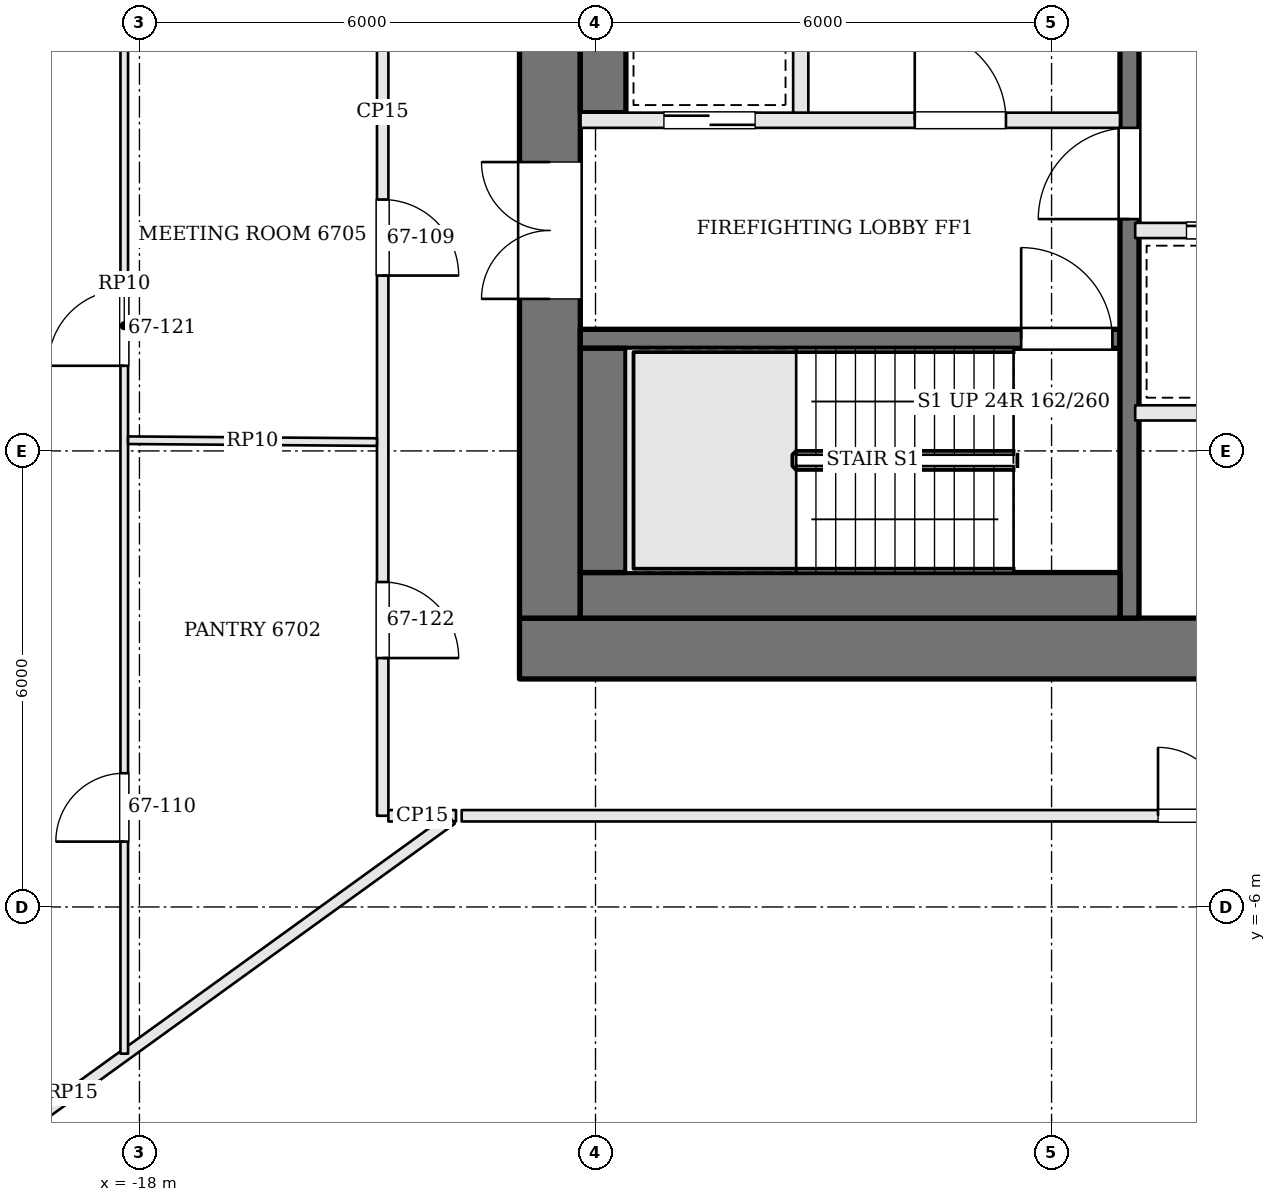
"""IFC4 building model, lengths in metres.
Left out: names, types, materials, properties, quantities, classifications, styles, units other than length and angle.
Written with IfcOpenShell. Run it as: python <this file> out.ifc"""

import sys

from ifc_helpers import new_model, si_unit, direction, frame, frame_2d, origin, place, context, subcontext, project, spatial, rectangle, extrude, element, fill, save


model = new_model("IFC4")
c1 = context("Model", 3, precision=1e-05, world=origin(), true_north=direction((0.0, 1.0)))
c2 = subcontext(c1, "Body", "Model", "MODEL_VIEW")
j1 = project(units=[si_unit("LENGTHUNIT", "METRE"), si_unit("PLANEANGLEUNIT", "RADIAN")], contexts=[c1])
p1 = place(None, origin())
s1 = spatial("IfcSite", under=j1, at=p1, CompositionType="ELEMENT")
p2 = place(p1, origin())
s2 = spatial("IfcBuilding", under=s1, at=p2, CompositionType="ELEMENT")
p3 = place(p2, frame((0.0, 0.0, 272.7)))
s3 = spatial("IfcBuildingStorey", under=s2, at=p3, CompositionType="ELEMENT", Elevation=272.7)
p4 = place(p3, frame((-13.0, -2.6, 0.0), z_axis=(0.0, 0.0, 1.0), x_axis=(1.0, 0.0, 0.0)))
e1 = element("IfcWall", 1, at=p4, inside=s3, PredefinedType="SHEAR", context=c2, shape_type="SweptSolid", body=[
    extrude(rectangle(XDim=26.0, YDim=0.8, at=frame_2d((13.0, 0.0))), origin(), (0.0, 0.0, 1.0), 3.9),
])
p5 = place(p4, frame((9.475, 0.0, 0.0)))
e2 = element("IfcOpeningElement", 2, at=p5, cuts=e1, PredefinedType="OPENING", context=c2, shape_type="SweptSolid", body=[
    extrude(rectangle(XDim=0.9, YDim=2.1, at=frame_2d((0.45, 1.05))), frame((0.0, 0.41, 0.0), z_axis=(0.0, -1.0, 0.0), x_axis=(1.0, 0.0, 0.0)), (0.0, 0.0, 1.0), 0.82),
])
p6 = place(p4, frame((12.75, 0.0, 0.0)))
e3 = element("IfcOpeningElement", 3, at=p6, cuts=e1, PredefinedType="OPENING", context=c2, shape_type="SweptSolid", body=[
    extrude(rectangle(XDim=0.9, YDim=2.1, at=frame_2d((0.45, 1.05))), frame((0.0, 0.41, 0.0), z_axis=(0.0, -1.0, 0.0), x_axis=(1.0, 0.0, 0.0)), (0.0, 0.0, 1.0), 0.82),
])
p7 = place(p4, frame((15.05, 0.0, 0.0)))
e4 = element("IfcOpeningElement", 4, at=p7, cuts=e1, PredefinedType="OPENING", context=c2, shape_type="SweptSolid", body=[
    extrude(rectangle(XDim=1.0, YDim=2.1, at=frame_2d((0.5, 1.05))), frame((0.0, 0.41, 0.0), z_axis=(0.0, -1.0, 0.0), x_axis=(1.0, 0.0, 0.0)), (0.0, 0.0, 1.0), 0.82),
])
p8 = place(p4, frame((16.825, 0.0, 0.0)))
e5 = element("IfcOpeningElement", 5, at=p8, cuts=e1, PredefinedType="OPENING", context=c2, shape_type="SweptSolid", body=[
    extrude(rectangle(XDim=0.7, YDim=2.1, at=frame_2d((0.35, 1.05))), frame((0.0, 0.41, 0.0), z_axis=(0.0, -1.0, 0.0), x_axis=(1.0, 0.0, 0.0)), (0.0, 0.0, 1.0), 0.82),
])
p9 = place(p3, frame((-12.6, -2.2, 0.0), z_axis=(0.0, 0.0, 1.0), x_axis=(0.0, 1.0, 0.0)))
e6 = element("IfcWall", 6, at=p9, inside=s3, PredefinedType="SHEAR", context=c2, shape_type="SweptSolid", body=[
    extrude(rectangle(XDim=13.4, YDim=0.8, at=frame_2d((6.7, 0.0))), origin(), (0.0, 0.0, 1.0), 3.9),
])
p10 = place(p9, frame((4.2, 0.0, 0.0)))
e7 = element("IfcOpeningElement", 7, at=p10, cuts=e6, PredefinedType="OPENING", context=c2, shape_type="SweptSolid", body=[
    extrude(rectangle(XDim=1.8, YDim=2.1, at=frame_2d((0.9, 1.05))), frame((0.0, 0.41, 0.0), z_axis=(0.0, -1.0, 0.0), x_axis=(1.0, 0.0, 0.0)), (0.0, 0.0, 1.0), 0.82),
])
p11 = place(p3, frame((-12.2, 1.475, 0.0), z_axis=(0.0, 0.0, 1.0), x_axis=(1.0, 0.0, 0.0)))
e8 = element("IfcWall", 8, at=p11, inside=s3, PredefinedType="SOLIDWALL", context=c2, shape_type="SweptSolid", body=[
    extrude(rectangle(XDim=7.1, YDim=0.25, at=frame_2d((3.55, 0.0))), origin(), (0.0, 0.0, 1.0), 3.7),
])
p12 = place(p11, frame((5.8, 0.0, 0.0)))
e9 = element("IfcOpeningElement", 9, at=p12, cuts=e8, PredefinedType="OPENING", context=c2, shape_type="SweptSolid", body=[
    extrude(rectangle(XDim=1.2, YDim=2.1, at=frame_2d((0.6, 1.05))), frame((0.0, 0.135, 0.0), z_axis=(0.0, -1.0, 0.0), x_axis=(1.0, 0.0, 0.0)), (0.0, 0.0, 1.0), 0.27),
])
p13 = place(p3, frame((-12.2, 4.35, 0.0), z_axis=(0.0, 0.0, 1.0), x_axis=(1.0, 0.0, 0.0)))
e10 = element("IfcWall", 10, at=p13, inside=s3, PredefinedType="SOLIDWALL", context=c2, shape_type="SweptSolid", body=[
    extrude(rectangle(XDim=7.1, YDim=0.2, at=frame_2d((3.55, 0.0))), origin(), (0.0, 0.0, 1.0), 3.7),
])
p14 = place(p13, frame((4.4, 0.0, 0.0)))
e11 = element("IfcOpeningElement", 11, at=p14, cuts=e10, PredefinedType="OPENING", context=c2, shape_type="SweptSolid", body=[
    extrude(rectangle(XDim=1.2, YDim=2.1, at=frame_2d((0.6, 1.05))), frame((0.0, 0.11, 0.0), z_axis=(0.0, -1.0, 0.0), x_axis=(1.0, 0.0, 0.0)), (0.0, 0.0, 1.0), 0.22),
])
p15 = place(p13, frame((1.1, 0.0, 0.0)))
e12 = element("IfcOpeningElement", 12, at=p15, cuts=e10, PredefinedType="OPENING", context=c2, shape_type="SweptSolid", body=[
    extrude(rectangle(XDim=1.2, YDim=2.1, at=frame_2d((0.6, 1.05))), frame((0.0, 0.11, 0.0), z_axis=(0.0, -1.0, 0.0), x_axis=(1.0, 0.0, 0.0)), (0.0, 0.0, 1.0), 0.22),
])
p16 = place(p3, frame((-9.3, 4.45, 0.0), z_axis=(0.0, 0.0, 1.0), x_axis=(0.0, 1.0, 0.0)))
e13 = element("IfcWall", 13, at=p16, inside=s3, PredefinedType="SOLIDWALL", context=c2, shape_type="SweptSolid", body=[
    extrude(rectangle(XDim=3.0, YDim=0.2, at=frame_2d((1.5, 0.0))), origin(), (0.0, 0.0, 1.0), 3.7),
])
p17 = place(p3, frame((-4.975, -2.2, 0.0), z_axis=(0.0, 0.0, 1.0), x_axis=(0.0, 1.0, 0.0)))
e14 = element("IfcWall", 14, at=p17, inside=s3, PredefinedType="SOLIDWALL", context=c2, shape_type="SweptSolid", body=[
    extrude(rectangle(XDim=13.4, YDim=0.25, at=frame_2d((6.7, 0.0))), origin(), (0.0, 0.0, 1.0), 3.7),
])
p18 = place(p17, frame((5.25, 0.0, 0.0)))
e15 = element("IfcOpeningElement", 15, at=p18, cuts=e14, PredefinedType="OPENING", context=c2, shape_type="SweptSolid", body=[
    extrude(rectangle(XDim=1.2, YDim=2.1, at=frame_2d((0.6, 1.05))), frame((0.0, 0.135, 0.0), z_axis=(0.0, -1.0, 0.0), x_axis=(1.0, 0.0, 0.0)), (0.0, 0.0, 1.0), 0.27),
])
p19 = place(p3, frame((-12.2, -1.9, 0.0), z_axis=(0.0, 0.0, 1.0), x_axis=(1.0, 0.0, 0.0)))
e16 = element("IfcWall", 16, at=p19, inside=s3, PredefinedType="SOLIDWALL", context=c2, shape_type="SweptSolid", body=[
    extrude(rectangle(XDim=7.1, YDim=0.6, at=frame_2d((3.55, 0.0))), origin(), (0.0, 0.0, 1.0), 3.7),
])
p20 = place(p3, frame((-11.9, -1.6, 0.0), z_axis=(0.0, 0.0, 1.0), x_axis=(0.0, 1.0, 0.0)))
e17 = element("IfcWall", 17, at=p20, inside=s3, PredefinedType="SOLIDWALL", context=c2, shape_type="SweptSolid", body=[
    extrude(rectangle(XDim=2.95, YDim=0.6, at=frame_2d((1.475, 0.0))), origin(), (0.0, 0.0, 1.0), 3.7),
])
p21 = place(p3, frame((-11.9, 4.45, 0.0), z_axis=(0.0, 0.0, 1.0), x_axis=(0.0, 1.0, 0.0)))
e18 = element("IfcWall", 18, at=p21, inside=s3, PredefinedType="SOLIDWALL", context=c2, shape_type="SweptSolid", body=[
    extrude(rectangle(XDim=3.0, YDim=0.6, at=frame_2d((1.5, 0.0))), origin(), (0.0, 0.0, 1.0), 3.7),
])
p22 = place(p3, frame((-4.9, 0.5, 0.0), z_axis=(0.0, 0.0, 1.0), x_axis=(1.0, 0.0, 0.0)))
e19 = element("IfcWall", 19, at=p22, inside=s3, PredefinedType="SOLIDWALL", context=c2, shape_type="SweptSolid", body=[
    extrude(rectangle(XDim=9.8, YDim=0.2, at=frame_2d((4.9, 0.0))), origin(), (0.0, 0.0, 1.0), 3.7),
])
p23 = place(p3, frame((-4.9, 2.9, 0.0), z_axis=(0.0, 0.0, 1.0), x_axis=(1.0, 0.0, 0.0)))
e20 = element("IfcWall", 20, at=p23, inside=s3, PredefinedType="SOLIDWALL", context=c2, shape_type="SweptSolid", body=[
    extrude(rectangle(XDim=9.8, YDim=0.2, at=frame_2d((4.9, 0.0))), origin(), (0.0, 0.0, 1.0), 3.7),
])
p24 = place(p23, frame((0.675, 0.0, 0.0)))
e21 = element("IfcOpeningElement", 21, at=p24, cuts=e20, PredefinedType="OPENING", context=c2, shape_type="SweptSolid", body=[
    extrude(rectangle(XDim=1.1, YDim=2.1, at=frame_2d((0.55, 1.05))), frame((0.0, 0.11, 0.0), z_axis=(0.0, -1.0, 0.0), x_axis=(1.0, 0.0, 0.0)), (0.0, 0.0, 1.0), 0.22),
])
p25 = place(p23, frame((2.613, 0.0, 0.0)))
e22 = element("IfcOpeningElement", 22, at=p25, cuts=e20, PredefinedType="OPENING", context=c2, shape_type="SweptSolid", body=[
    extrude(rectangle(XDim=0.9, YDim=2.1, at=frame_2d((0.45, 1.05))), frame((0.0, 0.11, 0.0), z_axis=(0.0, -1.0, 0.0), x_axis=(1.0, 0.0, 0.0)), (0.0, 0.0, 1.0), 0.22),
])
p26 = place(p23, frame((4.35, 0.0, 0.0)))
e23 = element("IfcOpeningElement", 23, at=p26, cuts=e20, PredefinedType="OPENING", context=c2, shape_type="SweptSolid", body=[
    extrude(rectangle(XDim=1.1, YDim=2.1, at=frame_2d((0.55, 1.05))), frame((0.0, 0.11, 0.0), z_axis=(0.0, -1.0, 0.0), x_axis=(1.0, 0.0, 0.0)), (0.0, 0.0, 1.0), 0.22),
])
p27 = place(p23, frame((7.463, 0.0, 0.0)))
e24 = element("IfcOpeningElement", 24, at=p27, cuts=e20, PredefinedType="OPENING", context=c2, shape_type="SweptSolid", body=[
    extrude(rectangle(XDim=1.0, YDim=2.1, at=frame_2d((0.5, 1.05))), frame((0.0, 0.11, 0.0), z_axis=(0.0, -1.0, 0.0), x_axis=(1.0, 0.0, 0.0)), (0.0, 0.0, 1.0), 0.22),
])
p28 = place(p3, frame((-14.8, 13.725, 0.0), z_axis=(0.0, 0.0, 1.0), x_axis=(0.0, -1.0, 0.0)))
e25 = element("IfcWall", 25, at=p28, inside=s3, PredefinedType="PARTITIONING", context=c2, shape_type="SweptSolid", body=[
    extrude(rectangle(XDim=18.525, YDim=0.15, at=frame_2d((9.263, 0.0))), origin(), (0.0, 0.0, 1.0), 3.198),
])
p29 = place(p28, frame((3.171, 0.0, 0.0)))
e26 = element("IfcOpeningElement", 26, at=p29, cuts=e25, PredefinedType="OPENING", context=c2, shape_type="SweptSolid", body=[
    extrude(rectangle(XDim=1.0, YDim=2.4, at=frame_2d((0.5, 1.2))), frame((0.0, 0.085, 0.0), z_axis=(0.0, -1.0, 0.0), x_axis=(1.0, 0.0, 0.0)), (0.0, 0.0, 1.0), 0.17),
])
p30 = place(p28, frame((10.418, 0.0, 0.0)))
e27 = element("IfcOpeningElement", 27, at=p30, cuts=e25, PredefinedType="OPENING", context=c2, shape_type="SweptSolid", body=[
    extrude(rectangle(XDim=1.0, YDim=2.4, at=frame_2d((0.5, 1.2))), frame((0.0, 0.085, 0.0), z_axis=(0.0, -1.0, 0.0), x_axis=(1.0, 0.0, 0.0)), (0.0, 0.0, 1.0), 0.17),
])
p31 = place(p28, frame((15.45, 0.0, 0.0)))
e28 = element("IfcOpeningElement", 28, at=p31, cuts=e25, PredefinedType="OPENING", context=c2, shape_type="SweptSolid", body=[
    extrude(rectangle(XDim=1.0, YDim=2.1, at=frame_2d((0.5, 1.05))), frame((0.0, 0.085, 0.0), z_axis=(0.0, -1.0, 0.0), x_axis=(1.0, 0.0, 0.0)), (0.0, 0.0, 1.0), 0.17),
])
p32 = place(p3, frame((-14.725, -4.8, 0.0), z_axis=(0.0, 0.0, 1.0), x_axis=(1.0, 0.0, 0.0)))
e29 = element("IfcWall", 29, at=p32, inside=s3, PredefinedType="PARTITIONING", context=c2, shape_type="SweptSolid", body=[
    extrude(rectangle(XDim=0.89, YDim=0.15, at=frame_2d((0.445, 0.0))), origin(), (0.0, 0.0, 1.0), 3.198),
])
p33 = place(p3, frame((-23.877, -12.058, 0.0), z_axis=(0.0, 0.0, 1.0), x_axis=(0.810464316252, 0.585788009506, 0.0)))
e30 = element("IfcWall", 30, at=p33, inside=s3, PredefinedType="PARTITIONING", context=c2, shape_type="SweptSolid", body=[
    extrude(rectangle(XDim=12.315, YDim=0.15, at=frame_2d((6.157, 0.0))), origin(), (0.0, 0.0, 1.0), 3.198),
])
p34 = place(p3, frame((-13.76, -4.8, 0.0), z_axis=(0.0, 0.0, 1.0), x_axis=(1.0, 0.0, 0.0)))
e31 = element("IfcWall", 31, at=p34, inside=s3, PredefinedType="PARTITIONING", context=c2, shape_type="SweptSolid", body=[
    extrude(rectangle(XDim=20.197, YDim=0.15, at=frame_2d((10.099, 0.0))), origin(), (0.0, 0.0, 1.0), 3.198),
])
p35 = place(p34, frame((9.161, 0.0, 0.0)))
e32 = element("IfcOpeningElement", 32, at=p35, cuts=e31, PredefinedType="OPENING", context=c2, shape_type="SweptSolid", body=[
    extrude(rectangle(XDim=1.8, YDim=2.1, at=frame_2d((0.9, 1.05))), frame((0.0, 0.085, 0.0), z_axis=(0.0, -1.0, 0.0), x_axis=(1.0, 0.0, 0.0)), (0.0, 0.0, 1.0), 0.17),
])
p36 = place(p3, frame((-18.2, -7.93, 0.0), z_axis=(0.0, 0.0, 1.0), x_axis=(0.0, 1.0, 0.0)))
e33 = element("IfcWall", 33, at=p36, inside=s3, PredefinedType="PARTITIONING", context=c2, shape_type="SweptSolid", body=[
    extrude(rectangle(XDim=19.154, YDim=0.1, at=frame_2d((9.577, 0.0))), origin(), (0.0, 0.0, 1.0), 3.184),
])
p37 = place(p36, frame((2.79, 0.0, 0.0)))
e34 = element("IfcOpeningElement", 34, at=p37, cuts=e33, PredefinedType="OPENING", context=c2, shape_type="SweptSolid", body=[
    extrude(rectangle(XDim=0.9, YDim=2.1, at=frame_2d((0.45, 1.05))), frame((0.0, 0.06, 0.0), z_axis=(0.0, -1.0, 0.0), x_axis=(1.0, 0.0, 0.0)), (0.0, 0.0, 1.0), 0.12),
])
p38 = place(p36, frame((9.05, 0.0, 0.0)))
e35 = element("IfcOpeningElement", 35, at=p38, cuts=e33, PredefinedType="OPENING", context=c2, shape_type="SweptSolid", body=[
    extrude(rectangle(XDim=1.0, YDim=2.4, at=frame_2d((0.5, 1.2))), frame((0.0, 0.06, 0.0), z_axis=(0.0, -1.0, 0.0), x_axis=(1.0, 0.0, 0.0)), (0.0, 0.0, 1.0), 0.12),
])
p39 = place(p3, frame((-14.875, 0.116, 0.0), z_axis=(0.0, 0.0, 1.0), x_axis=(-0.999972213407, 0.007454690722, 0.0)))
e36 = element("IfcWall", 36, at=p39, inside=s3, PredefinedType="PARTITIONING", context=c2, shape_type="SweptSolid", body=[
    extrude(rectangle(XDim=3.275, YDim=0.1, at=frame_2d((1.637, 0.0))), origin(), (0.0, 0.0, 1.0), 3.184),
])
p40 = place(p10, origin())
e37 = element("IfcDoor", 37, at=p40, inside=s3, OperationType="DOUBLE_DOOR_SINGLE_SWING", PredefinedType="DOOR", context=c2, shape_type="SweptSolid", body=[
    extrude(rectangle(XDim=1.8, YDim=2.1, at=frame_2d((0.9, 1.05))), frame((0.0, 0.025, 0.0), z_axis=(0.0, -1.0, 0.0), x_axis=(1.0, 0.0, 0.0)), (0.0, 0.0, 1.0), 0.05),
])
fill(e7, e37)
p41 = place(p18, origin())
e38 = element("IfcDoor", 38, at=p41, inside=s3, OperationType="SINGLE_SWING_LEFT", PredefinedType="DOOR", context=c2, shape_type="SweptSolid", body=[
    extrude(rectangle(XDim=1.2, YDim=2.1, at=frame_2d((0.6, 1.05))), frame((0.0, 0.025, 0.0), z_axis=(0.0, -1.0, 0.0), x_axis=(1.0, 0.0, 0.0)), (0.0, 0.0, 1.0), 0.05),
])
fill(e15, e38)
p42 = place(p14, origin())
e39 = element("IfcDoor", 39, at=p42, inside=s3, OperationType="SINGLE_SWING_LEFT", PredefinedType="DOOR", context=c2, shape_type="SweptSolid", body=[
    extrude(rectangle(XDim=1.2, YDim=2.1, at=frame_2d((0.6, 1.05))), frame((0.0, 0.025, 0.0), z_axis=(0.0, -1.0, 0.0), x_axis=(1.0, 0.0, 0.0)), (0.0, 0.0, 1.0), 0.05),
])
fill(e11, e39)
p43 = place(p12, origin())
e40 = element("IfcDoor", 40, at=p43, inside=s3, OperationType="SINGLE_SWING_LEFT", PredefinedType="DOOR", context=c2, shape_type="SweptSolid", body=[
    extrude(rectangle(XDim=1.2, YDim=2.1, at=frame_2d((0.6, 1.05))), frame((0.0, 0.025, 0.0), z_axis=(0.0, -1.0, 0.0), x_axis=(1.0, 0.0, 0.0)), (0.0, 0.0, 1.0), 0.05),
])
fill(e9, e40)
p44 = place(p15, origin())
e41 = element("IfcDoor", 41, at=p44, inside=s3, OperationType="SLIDING_TO_RIGHT", PredefinedType="DOOR", context=c2, shape_type="SweptSolid", body=[
    extrude(rectangle(XDim=1.2, YDim=2.1, at=frame_2d((0.6, 1.05))), frame((0.0, 0.025, 0.0), z_axis=(0.0, -1.0, 0.0), x_axis=(1.0, 0.0, 0.0)), (0.0, 0.0, 1.0), 0.05),
])
fill(e12, e41)
p45 = place(p24, origin())
e42 = element("IfcDoor", 42, at=p45, inside=s3, OperationType="SLIDING_TO_RIGHT", PredefinedType="DOOR", context=c2, shape_type="SweptSolid", body=[
    extrude(rectangle(XDim=1.1, YDim=2.1, at=frame_2d((0.55, 1.05))), frame((0.0, 0.025, 0.0), z_axis=(0.0, -1.0, 0.0), x_axis=(1.0, 0.0, 0.0)), (0.0, 0.0, 1.0), 0.05),
])
fill(e21, e42)
p46 = place(p30, origin())
e43 = element("IfcDoor", 43, at=p46, inside=s3, OperationType="SINGLE_SWING_RIGHT", PredefinedType="DOOR", context=c2, shape_type="SweptSolid", body=[
    extrude(rectangle(XDim=1.0, YDim=2.4, at=frame_2d((0.5, 1.2))), frame((0.0, 0.025, 0.0), z_axis=(0.0, -1.0, 0.0), x_axis=(1.0, 0.0, 0.0)), (0.0, 0.0, 1.0), 0.05),
])
fill(e27, e43)
p47 = place(p37, origin())
e44 = element("IfcDoor", 44, at=p47, inside=s3, OperationType="SINGLE_SWING_LEFT", PredefinedType="DOOR", context=c2, shape_type="SweptSolid", body=[
    extrude(rectangle(XDim=0.9, YDim=2.1, at=frame_2d((0.45, 1.05))), frame((0.0, 0.025, 0.0), z_axis=(0.0, -1.0, 0.0), x_axis=(1.0, 0.0, 0.0)), (0.0, 0.0, 1.0), 0.05),
])
fill(e34, e44)
p48 = place(p35, origin())
e45 = element("IfcDoor", 45, at=p48, inside=s3, OperationType="DOUBLE_DOOR_SINGLE_SWING", PredefinedType="DOOR", context=c2, shape_type="SweptSolid", body=[
    extrude(rectangle(XDim=1.8, YDim=2.1, at=frame_2d((0.9, 1.05))), frame((0.0, 0.025, 0.0), z_axis=(0.0, -1.0, 0.0), x_axis=(1.0, 0.0, 0.0)), (0.0, 0.0, 1.0), 0.05),
])
fill(e32, e45)
p49 = place(p38, origin())
e46 = element("IfcDoor", 46, at=p49, inside=s3, OperationType="SINGLE_SWING_LEFT", PredefinedType="DOOR", context=c2, shape_type="SweptSolid", body=[
    extrude(rectangle(XDim=1.0, YDim=2.4, at=frame_2d((0.5, 1.2))), frame((0.0, 0.025, 0.0), z_axis=(0.0, -1.0, 0.0), x_axis=(1.0, 0.0, 0.0)), (0.0, 0.0, 1.0), 0.05),
])
fill(e35, e46)
p50 = place(p31, origin())
e47 = element("IfcDoor", 47, at=p50, inside=s3, OperationType="SINGLE_SWING_RIGHT", PredefinedType="DOOR", context=c2, shape_type="SweptSolid", body=[
    extrude(rectangle(XDim=1.0, YDim=2.1, at=frame_2d((0.5, 1.05))), frame((0.0, 0.025, 0.0), z_axis=(0.0, -1.0, 0.0), x_axis=(1.0, 0.0, 0.0)), (0.0, 0.0, 1.0), 0.05),
])
fill(e28, e47)
save(model, sys.argv[1])
